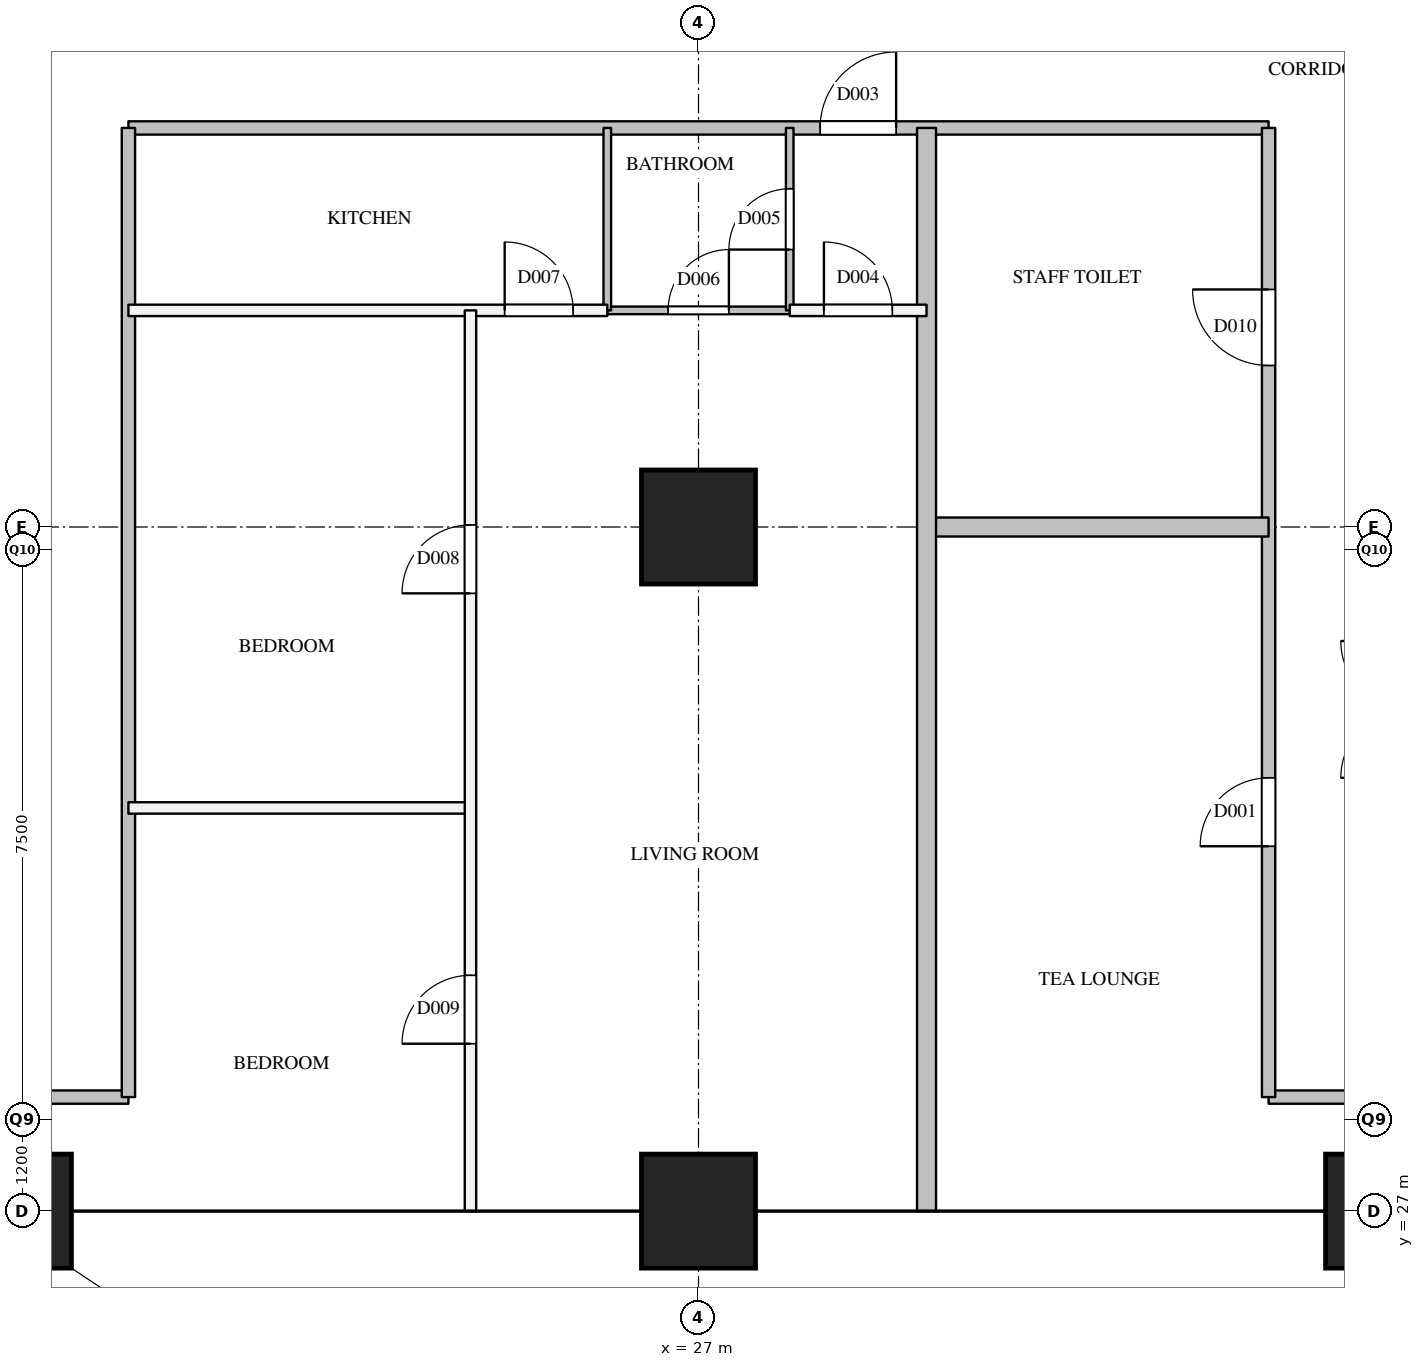
"""IFC4 building model, lengths in metres.
Left out: names, types, materials, properties, quantities, classifications, styles, units other than length and angle.
Written with IfcOpenShell. Run it as: python <this file> out.ifc"""

import sys

from ifc_helpers import new_model, si_unit, direction, frame, frame_2d, origin, origin_2d, place, context, subcontext, project, spatial, rectangle, extrude, element, fill, save


model = new_model("IFC4")
c1 = context("Model", 3, precision=1e-05, world=origin(), true_north=direction((0.0, 1.0)))
c2 = subcontext(c1, "Body", "Model", "MODEL_VIEW")
j1 = project(units=[si_unit("LENGTHUNIT", "METRE"), si_unit("PLANEANGLEUNIT", "RADIAN")], contexts=[c1])
p1 = place(None, origin())
s1 = spatial("IfcSite", under=j1, at=p1, CompositionType="ELEMENT")
p2 = place(p1, origin())
s2 = spatial("IfcBuilding", under=s1, at=p2, CompositionType="ELEMENT")
p3 = place(p2, frame((0.0, 0.0, 154.4)))
s3 = spatial("IfcBuildingStorey", under=s2, at=p3, CompositionType="ELEMENT", Elevation=154.4)
for number, where, z_axis, x_axis in (
    (1, (18.0, 27.0, 0.0), (0.0, 0.0, 1.0), (1.0, 0.0, 0.0)),
    (2, (27.0, 27.0, 0.0), (0.0, 0.0, 1.0), (1.0, 0.0, 0.0)),
    (3, (27.0, 36.0, 0.0), (0.0, 0.0, 1.0), (1.0, 0.0, 0.0)),
    (4, (36.0, 27.0, 0.0), (0.0, 0.0, 1.0), (1.0, 0.0, 0.0)),
):
    element("IfcColumn", number, at=place(p3, frame(where, z_axis=z_axis, x_axis=x_axis)), inside=s3, PredefinedType="COLUMN", context=c2, shape_type="SweptSolid", body=[
        extrude(rectangle(XDim=1.5, YDim=1.5, at=origin_2d()), origin(), (0.0, 0.0, 1.0), 3.9),
    ])
for number, where, z_axis, x_axis in (
    (5, (18.0, 28.5, 0.0), (0.0, 0.0, 1.0), (1.0, 0.0, 0.0)),
    (6, (34.5, 28.5, 0.0), (0.0, 0.0, 1.0), (1.0, 0.0, 0.0)),
):
    element("IfcWall", number, at=place(p3, frame(where, z_axis=z_axis, x_axis=x_axis)), inside=s3, PredefinedType="PARTITIONING", context=c2, shape_type="SweptSolid", body=[
        extrude(rectangle(XDim=1.5, YDim=0.175, at=frame_2d((0.75, 0.0))), origin(), (0.0, 0.0, 1.0), 3.6),
    ])
p4 = place(p3, frame((19.5, 41.25, 0.0), z_axis=(0.0, 0.0, 1.0), x_axis=(1.0, 0.0, 0.0)))
e7 = element("IfcWall", 7, at=p4, inside=s3, PredefinedType="PARTITIONING", context=c2, shape_type="SweptSolid", body=[
    extrude(rectangle(XDim=15.0, YDim=0.175, at=frame_2d((7.5, 0.0))), origin(), (0.0, 0.0, 1.0), 2.6),
])
p5 = place(p4, frame((9.1, 0.0, 0.0)))
e8 = element("IfcOpeningElement", 8, at=p5, cuts=e7, PredefinedType="OPENING", context=c2, shape_type="SweptSolid", body=[
    extrude(rectangle(XDim=1.0, YDim=2.1, at=frame_2d((0.5, 1.05))), frame((0.0, 0.097, 0.0), z_axis=(0.0, -1.0, 0.0), x_axis=(1.0, 0.0, 0.0)), (0.0, 0.0, 1.0), 0.195),
])
p6 = place(p3, frame((19.5, 28.5, 0.0), z_axis=(0.0, 0.0, 1.0), x_axis=(0.0, 1.0, 0.0)))
e9 = element("IfcWall", 9, at=p6, inside=s3, PredefinedType="PARTITIONING", context=c2, shape_type="SweptSolid", body=[
    extrude(rectangle(XDim=12.75, YDim=0.175, at=frame_2d((6.375, 0.0))), origin(), (0.0, 0.0, 1.0), 3.6),
])
p7 = place(p3, frame((34.5, 28.5, 0.0), z_axis=(0.0, 0.0, 1.0), x_axis=(0.0, 1.0, 0.0)))
e10 = element("IfcWall", 10, at=p7, inside=s3, PredefinedType="PARTITIONING", context=c2, shape_type="SweptSolid", body=[
    extrude(rectangle(XDim=12.75, YDim=0.175, at=frame_2d((6.375, 0.0))), origin(), (0.0, 0.0, 1.0), 3.6),
])
p8 = place(p7, frame((3.3, 0.0, 0.0)))
e11 = element("IfcOpeningElement", 11, at=p8, cuts=e10, PredefinedType="OPENING", context=c2, shape_type="SweptSolid", body=[
    extrude(rectangle(XDim=0.9, YDim=2.1, at=frame_2d((0.45, 1.05))), frame((0.0, 0.097, 0.0), z_axis=(0.0, -1.0, 0.0), x_axis=(1.0, 0.0, 0.0)), (0.0, 0.0, 1.0), 0.195),
])
p9 = place(p7, frame((9.625, 0.0, 0.0)))
e12 = element("IfcOpeningElement", 12, at=p9, cuts=e10, PredefinedType="OPENING", context=c2, shape_type="SweptSolid", body=[
    extrude(rectangle(XDim=1.0, YDim=2.1, at=frame_2d((0.5, 1.05))), frame((0.0, 0.097, 0.0), z_axis=(0.0, -1.0, 0.0), x_axis=(1.0, 0.0, 0.0)), (0.0, 0.0, 1.0), 0.195),
])
p10 = place(p3, frame((19.5, 32.304, 0.0), z_axis=(0.0, 0.0, 1.0), x_axis=(1.0, 0.0, 0.0)))
e13 = element("IfcWall", 13, at=p10, inside=s3, PredefinedType="PARTITIONING", context=c2, shape_type="SweptSolid", body=[
    extrude(rectangle(XDim=4.5, YDim=0.15, at=frame_2d((2.25, 0.0))), origin(), (0.0, 0.0, 1.0), 3.6),
])
p11 = place(p3, frame((19.5, 38.85, 0.0), z_axis=(0.0, 0.0, 1.0), x_axis=(1.0, 0.0, 0.0)))
e14 = element("IfcWall", 14, at=p11, inside=s3, PredefinedType="PARTITIONING", context=c2, shape_type="SweptSolid", body=[
    extrude(rectangle(XDim=6.3, YDim=0.15, at=frame_2d((3.15, 0.0))), origin(), (0.0, 0.0, 1.0), 3.6),
])
p12 = place(p11, frame((4.95, 0.0, 0.0)))
e15 = element("IfcOpeningElement", 15, at=p12, cuts=e14, PredefinedType="OPENING", context=c2, shape_type="SweptSolid", body=[
    extrude(rectangle(XDim=0.9, YDim=2.1, at=frame_2d((0.45, 1.05))), frame((0.0, 0.085, 0.0), z_axis=(0.0, -1.0, 0.0), x_axis=(1.0, 0.0, 0.0)), (0.0, 0.0, 1.0), 0.17),
])
p13 = place(p3, frame((28.2, 38.85, 0.0), z_axis=(0.0, 0.0, 1.0), x_axis=(1.0, 0.0, 0.0)))
e16 = element("IfcWall", 16, at=p13, inside=s3, PredefinedType="PARTITIONING", context=c2, shape_type="SweptSolid", body=[
    extrude(rectangle(XDim=1.8, YDim=0.15, at=frame_2d((0.9, 0.0))), origin(), (0.0, 0.0, 1.0), 3.6),
])
p14 = place(p13, frame((0.45, 0.0, 0.0)))
e17 = element("IfcOpeningElement", 17, at=p14, cuts=e16, PredefinedType="OPENING", context=c2, shape_type="SweptSolid", body=[
    extrude(rectangle(XDim=0.9, YDim=2.1, at=frame_2d((0.45, 1.05))), frame((0.0, 0.085, 0.0), z_axis=(0.0, -1.0, 0.0), x_axis=(1.0, 0.0, 0.0)), (0.0, 0.0, 1.0), 0.17),
])
p15 = place(p3, frame((24.0, 27.0, 0.0), z_axis=(0.0, 0.0, 1.0), x_axis=(0.0, 1.0, 0.0)))
e18 = element("IfcWall", 18, at=p15, inside=s3, PredefinedType="PARTITIONING", context=c2, shape_type="SweptSolid", body=[
    extrude(rectangle(XDim=11.85, YDim=0.15, at=frame_2d((5.925, 0.0))), origin(), (0.0, 0.0, 1.0), 2.6),
])
p16 = place(p15, frame((8.127, 0.0, 0.0)))
e19 = element("IfcOpeningElement", 19, at=p16, cuts=e18, PredefinedType="OPENING", context=c2, shape_type="SweptSolid", body=[
    extrude(rectangle(XDim=0.9, YDim=2.1, at=frame_2d((0.45, 1.05))), frame((0.0, 0.085, 0.0), z_axis=(0.0, -1.0, 0.0), x_axis=(1.0, 0.0, 0.0)), (0.0, 0.0, 1.0), 0.17),
])
p17 = place(p15, frame((2.202, 0.0, 0.0)))
e20 = element("IfcOpeningElement", 20, at=p17, cuts=e18, PredefinedType="OPENING", context=c2, shape_type="SweptSolid", body=[
    extrude(rectangle(XDim=0.9, YDim=2.1, at=frame_2d((0.45, 1.05))), frame((0.0, 0.085, 0.0), z_axis=(0.0, -1.0, 0.0), x_axis=(1.0, 0.0, 0.0)), (0.0, 0.0, 1.0), 0.17),
])
p18 = place(p3, frame((30.0, 36.0, 0.0), z_axis=(0.0, 0.0, 1.0), x_axis=(1.0, 0.0, 0.0)))
e21 = element("IfcWall", 21, at=p18, inside=s3, PredefinedType="PARTITIONING", context=c2, shape_type="SweptSolid", body=[
    extrude(rectangle(XDim=4.5, YDim=0.25, at=frame_2d((2.25, 0.0))), origin(), (0.0, 0.0, 1.0), 3.6),
])
p19 = place(p3, frame((30.0, 27.0, 0.0), z_axis=(0.0, 0.0, 1.0), x_axis=(0.0, 1.0, 0.0)))
e22 = element("IfcWall", 22, at=p19, inside=s3, PredefinedType="PARTITIONING", context=c2, shape_type="SweptSolid", body=[
    extrude(rectangle(XDim=14.25, YDim=0.25, at=frame_2d((7.125, 0.0))), origin(), (0.0, 0.0, 1.0), 2.6),
])
p20 = place(p3, frame((25.8, 38.85, 0.0), z_axis=(0.0, 0.0, 1.0), x_axis=(1.0, 0.0, 0.0)))
e23 = element("IfcWall", 23, at=p20, inside=s3, PredefinedType="PARTITIONING", context=c2, shape_type="SweptSolid", body=[
    extrude(rectangle(XDim=2.4, YDim=0.1, at=frame_2d((1.2, 0.0))), origin(), (0.0, 0.0, 1.0), 2.6),
])
p21 = place(p20, frame((0.8, 0.0, 0.0)))
e24 = element("IfcOpeningElement", 24, at=p21, cuts=e23, PredefinedType="OPENING", context=c2, shape_type="SweptSolid", body=[
    extrude(rectangle(XDim=0.8, YDim=2.1, at=frame_2d((0.4, 1.05))), frame((0.0, 0.06, 0.0), z_axis=(0.0, -1.0, 0.0), x_axis=(1.0, 0.0, 0.0)), (0.0, 0.0, 1.0), 0.12),
])
p22 = place(p3, frame((25.8, 38.85, 0.0), z_axis=(0.0, 0.0, 1.0), x_axis=(0.0, 1.0, 0.0)))
e25 = element("IfcWall", 25, at=p22, inside=s3, PredefinedType="PARTITIONING", context=c2, shape_type="SweptSolid", body=[
    extrude(rectangle(XDim=2.4, YDim=0.1, at=frame_2d((1.2, 0.0))), origin(), (0.0, 0.0, 1.0), 3.6),
])
p23 = place(p3, frame((28.2, 38.85, 0.0), z_axis=(0.0, 0.0, 1.0), x_axis=(0.0, 1.0, 0.0)))
e26 = element("IfcWall", 26, at=p23, inside=s3, PredefinedType="PARTITIONING", context=c2, shape_type="SweptSolid", body=[
    extrude(rectangle(XDim=2.4, YDim=0.1, at=frame_2d((1.2, 0.0))), origin(), (0.0, 0.0, 1.0), 3.6),
])
p24 = place(p23, frame((0.8, 0.0, 0.0)))
e27 = element("IfcOpeningElement", 27, at=p24, cuts=e26, PredefinedType="OPENING", context=c2, shape_type="SweptSolid", body=[
    extrude(rectangle(XDim=0.8, YDim=2.1, at=frame_2d((0.4, 1.05))), frame((0.0, 0.06, 0.0), z_axis=(0.0, -1.0, 0.0), x_axis=(1.0, 0.0, 0.0)), (0.0, 0.0, 1.0), 0.12),
])
p25 = place(p8, origin())
e28 = element("IfcDoor", 28, at=p25, inside=s3, OperationType="SINGLE_SWING_LEFT", PredefinedType="DOOR", context=c2, shape_type="SweptSolid", body=[
    extrude(rectangle(XDim=0.9, YDim=2.1, at=frame_2d((0.45, 1.05))), frame((0.0, 0.025, 0.0), z_axis=(0.0, -1.0, 0.0), x_axis=(1.0, 0.0, 0.0)), (0.0, 0.0, 1.0), 0.05),
])
fill(e11, e28)
p26 = place(p5, origin())
e29 = element("IfcDoor", 29, at=p26, inside=s3, OperationType="SINGLE_SWING_RIGHT", PredefinedType="DOOR", context=c2, shape_type="SweptSolid", body=[
    extrude(rectangle(XDim=1.0, YDim=2.1, at=frame_2d((0.5, 1.05))), frame((0.0, 0.025, 0.0), z_axis=(0.0, -1.0, 0.0), x_axis=(1.0, 0.0, 0.0)), (0.0, 0.0, 1.0), 0.05),
])
fill(e8, e29)
p27 = place(p14, origin())
e30 = element("IfcDoor", 30, at=p27, inside=s3, OperationType="SINGLE_SWING_LEFT", PredefinedType="DOOR", context=c2, shape_type="SweptSolid", body=[
    extrude(rectangle(XDim=0.9, YDim=2.1, at=frame_2d((0.45, 1.05))), frame((0.0, 0.025, 0.0), z_axis=(0.0, -1.0, 0.0), x_axis=(1.0, 0.0, 0.0)), (0.0, 0.0, 1.0), 0.05),
])
fill(e17, e30)
p28 = place(p24, origin())
e31 = element("IfcDoor", 31, at=p28, inside=s3, OperationType="SINGLE_SWING_LEFT", PredefinedType="DOOR", context=c2, shape_type="SweptSolid", body=[
    extrude(rectangle(XDim=0.8, YDim=2.1, at=frame_2d((0.4, 1.05))), frame((0.0, 0.025, 0.0), z_axis=(0.0, -1.0, 0.0), x_axis=(1.0, 0.0, 0.0)), (0.0, 0.0, 1.0), 0.05),
])
fill(e27, e31)
p29 = place(p21, origin())
e32 = element("IfcDoor", 32, at=p29, inside=s3, OperationType="SINGLE_SWING_RIGHT", PredefinedType="DOOR", context=c2, shape_type="SweptSolid", body=[
    extrude(rectangle(XDim=0.8, YDim=2.1, at=frame_2d((0.4, 1.05))), frame((0.0, 0.025, 0.0), z_axis=(0.0, -1.0, 0.0), x_axis=(1.0, 0.0, 0.0)), (0.0, 0.0, 1.0), 0.05),
])
fill(e24, e32)
p30 = place(p12, origin())
e33 = element("IfcDoor", 33, at=p30, inside=s3, OperationType="SINGLE_SWING_LEFT", PredefinedType="DOOR", context=c2, shape_type="SweptSolid", body=[
    extrude(rectangle(XDim=0.9, YDim=2.1, at=frame_2d((0.45, 1.05))), frame((0.0, 0.025, 0.0), z_axis=(0.0, -1.0, 0.0), x_axis=(1.0, 0.0, 0.0)), (0.0, 0.0, 1.0), 0.05),
])
fill(e15, e33)
p31 = place(p16, origin())
e34 = element("IfcDoor", 34, at=p31, inside=s3, OperationType="SINGLE_SWING_LEFT", PredefinedType="DOOR", context=c2, shape_type="SweptSolid", body=[
    extrude(rectangle(XDim=0.9, YDim=2.1, at=frame_2d((0.45, 1.05))), frame((0.0, 0.025, 0.0), z_axis=(0.0, -1.0, 0.0), x_axis=(1.0, 0.0, 0.0)), (0.0, 0.0, 1.0), 0.05),
])
fill(e19, e34)
p32 = place(p17, origin())
e35 = element("IfcDoor", 35, at=p32, inside=s3, OperationType="SINGLE_SWING_LEFT", PredefinedType="DOOR", context=c2, shape_type="SweptSolid", body=[
    extrude(rectangle(XDim=0.9, YDim=2.1, at=frame_2d((0.45, 1.05))), frame((0.0, 0.025, 0.0), z_axis=(0.0, -1.0, 0.0), x_axis=(1.0, 0.0, 0.0)), (0.0, 0.0, 1.0), 0.05),
])
fill(e20, e35)
p33 = place(p9, origin())
e36 = element("IfcDoor", 36, at=p33, inside=s3, OperationType="SINGLE_SWING_RIGHT", PredefinedType="DOOR", context=c2, shape_type="SweptSolid", body=[
    extrude(rectangle(XDim=1.0, YDim=2.1, at=frame_2d((0.5, 1.05))), frame((0.0, 0.025, 0.0), z_axis=(0.0, -1.0, 0.0), x_axis=(1.0, 0.0, 0.0)), (0.0, 0.0, 1.0), 0.05),
])
fill(e12, e36)
save(model, sys.argv[1])
